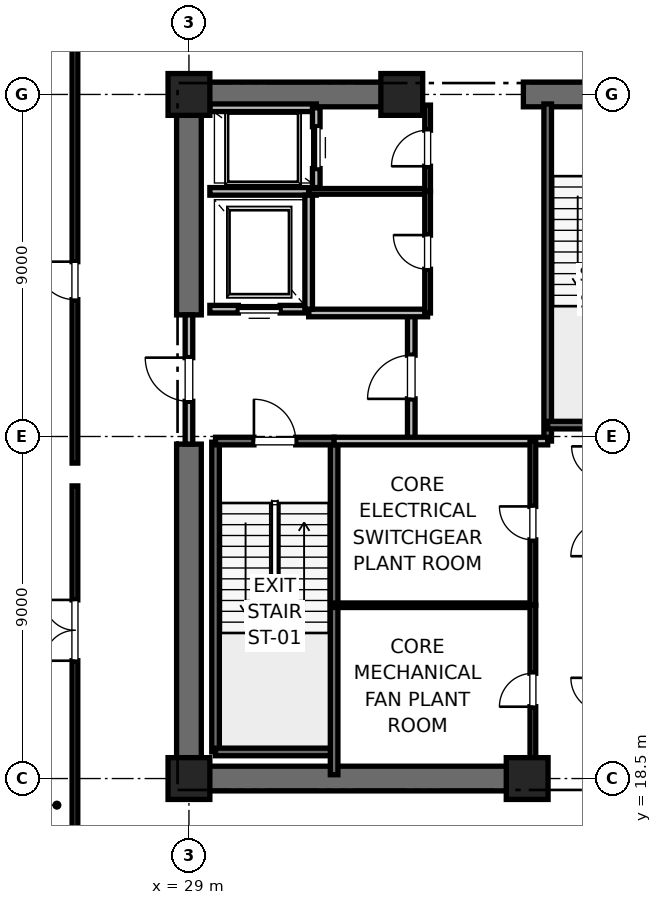
"""IFC4 building model, lengths in metres.
Left out: names, types, materials, properties, quantities, classifications, styles, units other than length and angle.
Written with IfcOpenShell. Run it as: python <this file> out.ifc"""

import sys

from ifc_helpers import new_model, si_unit, direction, frame, frame_2d, origin, origin_2d, place, context, subcontext, project, spatial, rectangle, extrude, element, fill, save


model = new_model("IFC4")
c1 = context("Model", 3, precision=1e-05, world=origin(), true_north=direction((0.0, 1.0)))
c2 = subcontext(c1, "Body", "Model", "MODEL_VIEW")
j1 = project(units=[si_unit("LENGTHUNIT", "METRE"), si_unit("PLANEANGLEUNIT", "RADIAN")], contexts=[c1])
p1 = place(None, origin())
s1 = spatial("IfcSite", under=j1, at=p1, CompositionType="ELEMENT")
p2 = place(p1, origin())
s2 = spatial("IfcBuilding", under=s1, at=p2, CompositionType="ELEMENT")
p3 = place(p2, frame((0.0, 0.0, -4.5)))
s3 = spatial("IfcBuildingStorey", under=s2, at=p3, CompositionType="ELEMENT", Elevation=-4.5)
for number, where, z_axis, x_axis in (
    (1, (29.0, 18.5, 0.0), (0.0, 0.0, 1.0), (1.0, 0.0, 0.0)),
    (2, (29.0, 36.5, 0.0), (0.0, 0.0, 1.0), (1.0, 0.0, 0.0)),
    (3, (37.9, 18.5, 0.0), (0.0, 0.0, 1.0), (1.0, 0.0, 0.0)),
    (4, (34.6, 36.5, 0.0), (0.0, 0.0, 1.0), (1.0, 0.0, 0.0)),
):
    element("IfcColumn", number, at=place(p3, frame(where, z_axis=z_axis, x_axis=x_axis)), inside=s3, PredefinedType="PILASTER", context=c2, shape_type="SweptSolid", body=[
        extrude(rectangle(XDim=1.1, YDim=1.1, at=origin_2d()), origin(), (0.0, 0.0, 1.0), 4.5),
    ])
p4 = place(p3, frame((29.0, 18.5, 0.0), z_axis=(0.0, 0.0, 1.0), x_axis=(1.0, 0.0, 0.0)))
e5 = element("IfcWall", 5, at=p4, inside=s3, PredefinedType="SHEAR", context=c2, shape_type="SweptSolid", body=[
    extrude(rectangle(XDim=9.2, YDim=0.65, at=frame_2d((4.6, 0.0))), origin(), (0.0, 0.0, 1.0), 4.22),
])
p5 = place(p3, frame((29.0, 36.5, 0.0), z_axis=(0.0, 0.0, 1.0), x_axis=(1.0, 0.0, 0.0)))
e6 = element("IfcWall", 6, at=p5, inside=s3, PredefinedType="SHEAR", context=c2, shape_type="SweptSolid", body=[
    extrude(rectangle(XDim=5.8, YDim=0.65, at=frame_2d((2.9, 0.0))), origin(), (0.0, 0.0, 1.0), 4.22),
])
p6 = place(p3, frame((37.8, 36.5, 0.0), z_axis=(0.0, 0.0, 1.0), x_axis=(1.0, 0.0, 0.0)))
e7 = element("IfcWall", 7, at=p6, inside=s3, PredefinedType="SHEAR", context=c2, shape_type="SweptSolid", body=[
    extrude(rectangle(XDim=4.4, YDim=0.65, at=frame_2d((2.2, 0.0))), origin(), (0.0, 0.0, 1.0), 4.22),
])
p7 = place(p6, frame((1.65, 0.0, 0.0)))
e8 = element("IfcOpeningElement", 8, at=p7, cuts=e7, PredefinedType="OPENING", context=c2, shape_type="SweptSolid", body=[
    extrude(rectangle(XDim=1.1, YDim=2.15, at=frame_2d((0.55, 1.075))), frame((0.0, 0.325, 0.0), z_axis=(0.0, -1.0, 0.0), x_axis=(1.0, 0.0, 0.0)), (0.0, 0.0, 1.0), 0.65),
])
p8 = place(p3, frame((29.0, 18.5, 0.0), z_axis=(0.0, 0.0, 1.0), x_axis=(0.0, 1.0, 0.0)))
e9 = element("IfcWall", 9, at=p8, inside=s3, PredefinedType="SHEAR", context=c2, shape_type="SweptSolid", body=[
    extrude(rectangle(XDim=8.8, YDim=0.65, at=frame_2d((4.4, 0.0))), origin(), (0.0, 0.0, 1.0), 4.22),
])
p9 = place(p3, frame((29.0, 30.7, 0.0), z_axis=(0.0, 0.0, 1.0), x_axis=(0.0, 1.0, 0.0)))
e10 = element("IfcWall", 10, at=p9, inside=s3, PredefinedType="SHEAR", context=c2, shape_type="SweptSolid", body=[
    extrude(rectangle(XDim=5.8, YDim=0.65, at=frame_2d((2.9, 0.0))), origin(), (0.0, 0.0, 1.0), 4.22),
])
p10 = place(p3, frame((29.7, 19.2, 0.0), z_axis=(0.0, 0.0, 1.0), x_axis=(0.0, 1.0, 0.0)))
e11 = element("IfcWall", 11, at=p10, inside=s3, PredefinedType="SOLIDWALL", context=c2, shape_type="SweptSolid", body=[
    extrude(rectangle(XDim=8.15, YDim=0.2, at=frame_2d((4.075, 0.0))), origin(), (0.0, 0.0, 1.0), 4.22),
])
p11 = place(p3, frame((29.7, 19.2, 0.0), z_axis=(0.0, 0.0, 1.0), x_axis=(1.0, 0.0, 0.0)))
e12 = element("IfcWall", 12, at=p11, inside=s3, PredefinedType="SOLIDWALL", context=c2, shape_type="SweptSolid", body=[
    extrude(rectangle(XDim=3.12, YDim=0.2, at=frame_2d((1.56, 0.0))), origin(), (0.0, 0.0, 1.0), 4.22),
])
p12 = place(p3, frame((32.82, 18.6, 0.0), z_axis=(0.0, 0.0, 1.0), x_axis=(0.0, 1.0, 0.0)))
e13 = element("IfcWall", 13, at=p12, inside=s3, PredefinedType="SOLIDWALL", context=c2, shape_type="SweptSolid", body=[
    extrude(rectangle(XDim=8.78, YDim=0.2, at=frame_2d((4.39, 0.0))), origin(), (0.0, 0.0, 1.0), 4.22),
])
p13 = place(p3, frame((29.7, 27.38, 0.0), z_axis=(0.0, 0.0, 1.0), x_axis=(1.0, 0.0, 0.0)))
e14 = element("IfcWall", 14, at=p13, inside=s3, PredefinedType="SOLIDWALL", context=c2, shape_type="SweptSolid", body=[
    extrude(rectangle(XDim=3.12, YDim=0.2, at=frame_2d((1.56, 0.0))), origin(), (0.0, 0.0, 1.0), 4.22),
])
p14 = place(p13, frame((1.01, 0.0, 0.0)))
e15 = element("IfcOpeningElement", 15, at=p14, cuts=e14, PredefinedType="OPENING", context=c2, shape_type="SweptSolid", body=[
    extrude(rectangle(XDim=1.1, YDim=2.15, at=frame_2d((0.55, 1.075))), frame((0.0, 0.1, 0.0), z_axis=(0.0, -1.0, 0.0), x_axis=(1.0, 0.0, 0.0)), (0.0, 0.0, 1.0), 0.2),
])
p15 = place(p3, frame((38.44, 27.38, 0.0), z_axis=(0.0, 0.0, 1.0), x_axis=(0.0, 1.0, 0.0)))
e16 = element("IfcWall", 16, at=p15, inside=s3, PredefinedType="SOLIDWALL", context=c2, shape_type="SweptSolid", body=[
    extrude(rectangle(XDim=8.87, YDim=0.2, at=frame_2d((4.435, 0.0))), origin(), (0.0, 0.0, 1.0), 4.22),
])
p16 = place(p3, frame((38.44, 27.8, 0.0), z_axis=(0.0, 0.0, 1.0), x_axis=(1.0, 0.0, 0.0)))
e17 = element("IfcWall", 17, at=p16, inside=s3, PredefinedType="SOLIDWALL", context=c2, shape_type="SweptSolid", body=[
    extrude(rectangle(XDim=3.32, YDim=0.2, at=frame_2d((1.66, 0.0))), origin(), (0.0, 0.0, 1.0), 4.22),
])
p17 = place(p3, frame((34.85, 27.38, 0.0), z_axis=(0.0, 0.0, 1.0), x_axis=(0.0, 1.0, 0.0)))
e18 = element("IfcWall", 18, at=p17, inside=s3, PredefinedType="PARTITIONING", context=c2, shape_type="SweptSolid", body=[
    extrude(rectangle(XDim=3.37, YDim=0.2, at=frame_2d((1.685, 0.0))), origin(), (0.0, 0.0, 1.0), 4.22),
])
p18 = place(p17, frame((1.11, 0.0, 0.0)))
e19 = element("IfcOpeningElement", 19, at=p18, cuts=e18, PredefinedType="OPENING", context=c2, shape_type="SweptSolid", body=[
    extrude(rectangle(XDim=1.15, YDim=2.2, at=frame_2d((0.575, 1.1))), frame((0.0, 0.1, 0.0), z_axis=(0.0, -1.0, 0.0), x_axis=(1.0, 0.0, 0.0)), (0.0, 0.0, 1.0), 0.2),
])
p19 = place(p3, frame((29.0, 27.3, 0.0), z_axis=(0.0, 0.0, 1.0), x_axis=(0.0, 1.0, 0.0)))
e20 = element("IfcWall", 20, at=p19, inside=s3, PredefinedType="PARTITIONING", context=c2, shape_type="SweptSolid", body=[
    extrude(rectangle(XDim=3.4, YDim=0.2, at=frame_2d((1.7, 0.0))), origin(), (0.0, 0.0, 1.0), 3.0),
])
p20 = place(p19, frame((1.125, 0.0, 0.0)))
e21 = element("IfcOpeningElement", 21, at=p20, cuts=e20, PredefinedType="OPENING", context=c2, shape_type="SweptSolid", body=[
    extrude(rectangle(XDim=1.15, YDim=2.2, at=frame_2d((0.575, 1.1))), frame((0.0, 0.1, 0.0), z_axis=(0.0, -1.0, 0.0), x_axis=(1.0, 0.0, 0.0)), (0.0, 0.0, 1.0), 0.2),
])
p21 = place(p3, frame((32.82, 27.38, 0.0), z_axis=(0.0, 0.0, 1.0), x_axis=(1.0, 0.0, 0.0)))
e22 = element("IfcWall", 22, at=p21, inside=s3, PredefinedType="PARTITIONING", context=c2, shape_type="SweptSolid", body=[
    extrude(rectangle(XDim=5.62, YDim=0.2, at=frame_2d((2.81, 0.0))), origin(), (0.0, 0.0, 1.0), 4.22),
])
p22 = place(p3, frame((32.15, 30.75, 0.0), z_axis=(0.0, 0.0, 1.0), x_axis=(1.0, 0.0, 0.0)))
e23 = element("IfcWall", 23, at=p22, inside=s3, PredefinedType="PARTITIONING", context=c2, shape_type="SweptSolid", body=[
    extrude(rectangle(XDim=3.13, YDim=0.2, at=frame_2d((1.565, 0.0))), origin(), (0.0, 0.0, 1.0), 4.22),
])
p23 = place(p3, frame((29.55, 30.85, 0.0), z_axis=(0.0, 0.0, 1.0), x_axis=(1.0, 0.0, 0.0)))
e24 = element("IfcWall", 24, at=p23, inside=s3, PredefinedType="SOLIDWALL", context=c2, shape_type="SweptSolid", body=[
    extrude(rectangle(XDim=2.6, YDim=0.2, at=frame_2d((1.3, 0.0))), origin(), (0.0, 0.0, 1.0), 3.0),
])
p24 = place(p23, frame((0.75, 0.0, 0.0)))
e25 = element("IfcOpeningElement", 25, at=p24, cuts=e24, PredefinedType="OPENING", context=c2, shape_type="SweptSolid", body=[
    extrude(rectangle(XDim=1.1, YDim=2.2, at=frame_2d((0.55, 1.1))), frame((0.0, 0.1, 0.0), z_axis=(0.0, -1.0, 0.0), x_axis=(1.0, 0.0, 0.0)), (0.0, 0.0, 1.0), 0.2),
])
p25 = place(p3, frame((29.55, 33.95, 0.0), z_axis=(0.0, 0.0, 1.0), x_axis=(1.0, 0.0, 0.0)))
e26 = element("IfcWall", 26, at=p25, inside=s3, PredefinedType="SOLIDWALL", context=c2, shape_type="SweptSolid", body=[
    extrude(rectangle(XDim=2.8, YDim=0.2, at=frame_2d((1.4, 0.0))), origin(), (0.0, 0.0, 1.0), 4.22),
])
p26 = place(p3, frame((32.15, 30.85, 0.0), z_axis=(0.0, 0.0, 1.0), x_axis=(0.0, 1.0, 0.0)))
e27 = element("IfcWall", 27, at=p26, inside=s3, PredefinedType="SOLIDWALL", context=c2, shape_type="SweptSolid", body=[
    extrude(rectangle(XDim=3.0, YDim=0.2, at=frame_2d((1.5, 0.0))), origin(), (0.0, 0.0, 1.0), 4.22),
])
p27 = place(p3, frame((32.35, 36.15, 0.0), z_axis=(0.0, 0.0, 1.0), x_axis=(-1.0, 0.0, 0.0)))
e28 = element("IfcWall", 28, at=p27, inside=s3, PredefinedType="SOLIDWALL", context=c2, shape_type="SweptSolid", body=[
    extrude(rectangle(XDim=2.8, YDim=0.2, at=frame_2d((1.4, 0.0))), origin(), (0.0, 0.0, 1.0), 3.4),
])
p28 = place(p3, frame((32.35, 34.05, 0.0), z_axis=(0.0, 0.0, 1.0), x_axis=(0.0, 1.0, 0.0)))
e29 = element("IfcWall", 29, at=p28, inside=s3, PredefinedType="SOLIDWALL", context=c2, shape_type="SweptSolid", body=[
    extrude(rectangle(XDim=2.1, YDim=0.2, at=frame_2d((1.05, 0.0))), origin(), (0.0, 0.0, 1.0), 4.22),
])
p29 = place(p28, frame((0.5, 0.0, 0.0)))
e30 = element("IfcOpeningElement", 30, at=p29, cuts=e29, PredefinedType="OPENING", context=c2, shape_type="SweptSolid", body=[
    extrude(rectangle(XDim=1.1, YDim=2.2, at=frame_2d((0.55, 1.1))), frame((0.0, 0.1, 0.0), z_axis=(0.0, -1.0, 0.0), x_axis=(1.0, 0.0, 0.0)), (0.0, 0.0, 1.0), 0.2),
])
p30 = place(p3, frame((32.15, 33.95, 0.0), z_axis=(0.0, 0.0, 1.0), x_axis=(1.0, 0.0, 0.0)))
e31 = element("IfcWall", 31, at=p30, inside=s3, PredefinedType="PARTITIONING", context=c2, shape_type="SweptSolid", body=[
    extrude(rectangle(XDim=3.13, YDim=0.15, at=frame_2d((1.565, 0.0))), origin(), (0.0, 0.0, 1.0), 2.85),
])
p31 = place(p3, frame((35.28, 33.95, 0.0), z_axis=(0.0, 0.0, 1.0), x_axis=(0.0, 1.0, 0.0)))
e32 = element("IfcWall", 32, at=p31, inside=s3, PredefinedType="PARTITIONING", context=c2, shape_type="SweptSolid", body=[
    extrude(rectangle(XDim=2.27, YDim=0.15, at=frame_2d((1.135, 0.0))), origin(), (0.0, 0.0, 1.0), 2.85),
])
p32 = place(p31, frame((0.66, 0.0, 0.0)))
e33 = element("IfcOpeningElement", 33, at=p32, cuts=e32, PredefinedType="OPENING", context=c2, shape_type="SweptSolid", body=[
    extrude(rectangle(XDim=0.95, YDim=2.15, at=frame_2d((0.475, 1.075))), frame((0.0, 0.075, 0.0), z_axis=(0.0, -1.0, 0.0), x_axis=(1.0, 0.0, 0.0)), (0.0, 0.0, 1.0), 0.15),
])
p33 = place(p3, frame((35.28, 30.75, 0.0), z_axis=(0.0, 0.0, 1.0), x_axis=(0.0, 1.0, 0.0)))
e34 = element("IfcWall", 34, at=p33, inside=s3, PredefinedType="PARTITIONING", context=c2, shape_type="SweptSolid", body=[
    extrude(rectangle(XDim=3.2, YDim=0.15, at=frame_2d((1.6, 0.0))), origin(), (0.0, 0.0, 1.0), 2.85),
])
p34 = place(p33, frame((1.15, 0.0, 0.0)))
e35 = element("IfcOpeningElement", 35, at=p34, cuts=e34, PredefinedType="OPENING", context=c2, shape_type="SweptSolid", body=[
    extrude(rectangle(XDim=0.9, YDim=2.1, at=frame_2d((0.45, 1.05))), frame((0.0, 0.075, 0.0), z_axis=(0.0, -1.0, 0.0), x_axis=(1.0, 0.0, 0.0)), (0.0, 0.0, 1.0), 0.15),
])
p35 = place(p3, frame((32.82, 23.06, 0.0), z_axis=(0.0, 0.0, 1.0), x_axis=(1.0, 0.0, 0.0)))
e36 = element("IfcWall", 36, at=p35, inside=s3, PredefinedType="PARTITIONING", context=c2, shape_type="SweptSolid", body=[
    extrude(rectangle(XDim=5.23, YDim=0.12, at=frame_2d((2.615, 0.0))), origin(), (0.0, 0.0, 1.0), 2.85),
])
p36 = place(p3, frame((38.05, 18.6, 0.0), z_axis=(0.0, 0.0, 1.0), x_axis=(0.0, 1.0, 0.0)))
e37 = element("IfcWall", 37, at=p36, inside=s3, PredefinedType="PARTITIONING", context=c2, shape_type="SweptSolid", body=[
    extrude(rectangle(XDim=4.46, YDim=0.15, at=frame_2d((2.23, 0.0))), origin(), (0.0, 0.0, 1.0), 2.85),
])
p37 = place(p36, frame((1.79, 0.0, 0.0)))
e38 = element("IfcOpeningElement", 38, at=p37, cuts=e37, PredefinedType="OPENING", context=c2, shape_type="SweptSolid", body=[
    extrude(rectangle(XDim=0.88, YDim=2.1, at=frame_2d((0.44, 1.05))), frame((0.0, 0.075, 0.0), z_axis=(0.0, -1.0, 0.0), x_axis=(1.0, 0.0, 0.0)), (0.0, 0.0, 1.0), 0.15),
])
p38 = place(p3, frame((38.05, 23.06, 0.0), z_axis=(0.0, 0.0, 1.0), x_axis=(0.0, 1.0, 0.0)))
e39 = element("IfcWall", 39, at=p38, inside=s3, PredefinedType="PARTITIONING", context=c2, shape_type="SweptSolid", body=[
    extrude(rectangle(XDim=4.32, YDim=0.15, at=frame_2d((2.16, 0.0))), origin(), (0.0, 0.0, 1.0), 2.85),
])
p39 = place(p38, frame((1.72, 0.0, 0.0)))
e40 = element("IfcOpeningElement", 40, at=p39, cuts=e39, PredefinedType="OPENING", context=c2, shape_type="SweptSolid", body=[
    extrude(rectangle(XDim=0.88, YDim=2.1, at=frame_2d((0.44, 1.05))), frame((0.0, 0.075, 0.0), z_axis=(0.0, -1.0, 0.0), x_axis=(1.0, 0.0, 0.0)), (0.0, 0.0, 1.0), 0.15),
])
p40 = place(p3, frame((26.0, 14.0, 0.0), z_axis=(0.0, 0.0, 1.0), x_axis=(0.0, 1.0, 0.0)))
e41 = element("IfcWall", 41, at=p40, inside=s3, PredefinedType="PARTITIONING", context=c2, shape_type="SweptSolid", body=[
    extrude(rectangle(XDim=12.2, YDim=0.15, at=frame_2d((6.1, 0.0))), origin(), (0.0, 0.0, 1.0), 2.85),
])
p41 = place(p40, frame((7.6, 0.0, 0.0)))
e42 = element("IfcOpeningElement", 42, at=p41, cuts=e41, PredefinedType="OPENING", context=c2, shape_type="SweptSolid", body=[
    extrude(rectangle(XDim=1.6, YDim=2.25, at=frame_2d((0.8, 1.125))), frame((0.0, 0.075, 0.0), z_axis=(0.0, -1.0, 0.0), x_axis=(1.0, 0.0, 0.0)), (0.0, 0.0, 1.0), 0.15),
])
p42 = place(p3, frame((26.0, 26.8, 0.0), z_axis=(0.0, 0.0, 1.0), x_axis=(0.0, 1.0, 0.0)))
e43 = element("IfcWall", 43, at=p42, inside=s3, PredefinedType="PARTITIONING", context=c2, shape_type="SweptSolid", body=[
    extrude(rectangle(XDim=12.2, YDim=0.15, at=frame_2d((6.1, 0.0))), origin(), (0.0, 0.0, 1.0), 2.85),
])
p43 = place(p42, frame((4.3, 0.0, 0.0)))
e44 = element("IfcOpeningElement", 44, at=p43, cuts=e43, PredefinedType="OPENING", context=c2, shape_type="SweptSolid", body=[
    extrude(rectangle(XDim=1.0, YDim=2.15, at=frame_2d((0.5, 1.075))), frame((0.0, 0.075, 0.0), z_axis=(0.0, -1.0, 0.0), x_axis=(1.0, 0.0, 0.0)), (0.0, 0.0, 1.0), 0.15),
])
p44 = place(p14, origin())
e45 = element("IfcDoor", 45, at=p44, inside=s3, OperationType="SINGLE_SWING_LEFT", PredefinedType="DOOR", context=c2, shape_type="SweptSolid", body=[
    extrude(rectangle(XDim=1.1, YDim=2.15, at=frame_2d((0.55, 1.075))), frame((0.0, 0.025, 0.0), z_axis=(0.0, -1.0, 0.0), x_axis=(1.0, 0.0, 0.0)), (0.0, 0.0, 1.0), 0.05),
])
fill(e15, e45)
p45 = place(p18, origin())
e46 = element("IfcDoor", 46, at=p45, inside=s3, OperationType="SINGLE_SWING_LEFT", PredefinedType="DOOR", context=c2, shape_type="SweptSolid", body=[
    extrude(rectangle(XDim=1.15, YDim=2.2, at=frame_2d((0.575, 1.1))), frame((0.0, 0.025, 0.0), z_axis=(0.0, -1.0, 0.0), x_axis=(1.0, 0.0, 0.0)), (0.0, 0.0, 1.0), 0.05),
])
fill(e19, e46)
p46 = place(p20, origin())
e47 = element("IfcDoor", 47, at=p46, inside=s3, OperationType="SINGLE_SWING_RIGHT", PredefinedType="DOOR", context=c2, shape_type="SweptSolid", body=[
    extrude(rectangle(XDim=1.15, YDim=2.2, at=frame_2d((0.575, 1.1))), frame((0.0, 0.025, 0.0), z_axis=(0.0, -1.0, 0.0), x_axis=(1.0, 0.0, 0.0)), (0.0, 0.0, 1.0), 0.05),
])
fill(e21, e47)
p47 = place(p24, origin())
e48 = element("IfcDoor", 48, at=p47, inside=s3, OperationType="SLIDING_TO_RIGHT", PredefinedType="DOOR", context=c2, shape_type="SweptSolid", body=[
    extrude(rectangle(XDim=1.1, YDim=2.2, at=frame_2d((0.55, 1.1))), frame((0.0, 0.025, 0.0), z_axis=(0.0, -1.0, 0.0), x_axis=(1.0, 0.0, 0.0)), (0.0, 0.0, 1.0), 0.05),
])
fill(e25, e48)
p48 = place(p29, origin())
e49 = element("IfcDoor", 49, at=p48, inside=s3, OperationType="SLIDING_TO_RIGHT", PredefinedType="DOOR", context=c2, shape_type="SweptSolid", body=[
    extrude(rectangle(XDim=1.1, YDim=2.2, at=frame_2d((0.55, 1.1))), frame((0.0, 0.025, 0.0), z_axis=(0.0, -1.0, 0.0), x_axis=(1.0, 0.0, 0.0)), (0.0, 0.0, 1.0), 0.05),
])
fill(e30, e49)
p49 = place(p32, origin())
e50 = element("IfcDoor", 50, at=p49, inside=s3, OperationType="SINGLE_SWING_LEFT", PredefinedType="DOOR", context=c2, shape_type="SweptSolid", body=[
    extrude(rectangle(XDim=0.95, YDim=2.15, at=frame_2d((0.475, 1.075))), frame((0.0, 0.025, 0.0), z_axis=(0.0, -1.0, 0.0), x_axis=(1.0, 0.0, 0.0)), (0.0, 0.0, 1.0), 0.05),
])
fill(e33, e50)
p50 = place(p34, origin())
e51 = element("IfcDoor", 51, at=p50, inside=s3, OperationType="SINGLE_SWING_RIGHT", PredefinedType="DOOR", context=c2, shape_type="SweptSolid", body=[
    extrude(rectangle(XDim=0.9, YDim=2.1, at=frame_2d((0.45, 1.05))), frame((0.0, 0.025, 0.0), z_axis=(0.0, -1.0, 0.0), x_axis=(1.0, 0.0, 0.0)), (0.0, 0.0, 1.0), 0.05),
])
fill(e35, e51)
p51 = place(p37, origin())
e52 = element("IfcDoor", 52, at=p51, inside=s3, OperationType="SINGLE_SWING_LEFT", PredefinedType="DOOR", context=c2, shape_type="SweptSolid", body=[
    extrude(rectangle(XDim=0.88, YDim=2.1, at=frame_2d((0.44, 1.05))), frame((0.0, 0.025, 0.0), z_axis=(0.0, -1.0, 0.0), x_axis=(1.0, 0.0, 0.0)), (0.0, 0.0, 1.0), 0.05),
])
fill(e38, e52)
p52 = place(p39, origin())
e53 = element("IfcDoor", 53, at=p52, inside=s3, OperationType="SINGLE_SWING_RIGHT", PredefinedType="DOOR", context=c2, shape_type="SweptSolid", body=[
    extrude(rectangle(XDim=0.88, YDim=2.1, at=frame_2d((0.44, 1.05))), frame((0.0, 0.025, 0.0), z_axis=(0.0, -1.0, 0.0), x_axis=(1.0, 0.0, 0.0)), (0.0, 0.0, 1.0), 0.05),
])
fill(e40, e53)
p53 = place(p41, origin())
e54 = element("IfcDoor", 54, at=p53, inside=s3, OperationType="DOUBLE_DOOR_SINGLE_SWING", PredefinedType="DOOR", context=c2, shape_type="SweptSolid", body=[
    extrude(rectangle(XDim=1.6, YDim=2.25, at=frame_2d((0.8, 1.125))), frame((0.0, 0.025, 0.0), z_axis=(0.0, -1.0, 0.0), x_axis=(1.0, 0.0, 0.0)), (0.0, 0.0, 1.0), 0.05),
])
fill(e42, e54)
p54 = place(p43, origin())
e55 = element("IfcDoor", 55, at=p54, inside=s3, OperationType="SINGLE_SWING_RIGHT", PredefinedType="DOOR", context=c2, shape_type="SweptSolid", body=[
    extrude(rectangle(XDim=1.0, YDim=2.15, at=frame_2d((0.5, 1.075))), frame((0.0, 0.025, 0.0), z_axis=(0.0, -1.0, 0.0), x_axis=(1.0, 0.0, 0.0)), (0.0, 0.0, 1.0), 0.05),
])
fill(e44, e55)
save(model, sys.argv[1])
